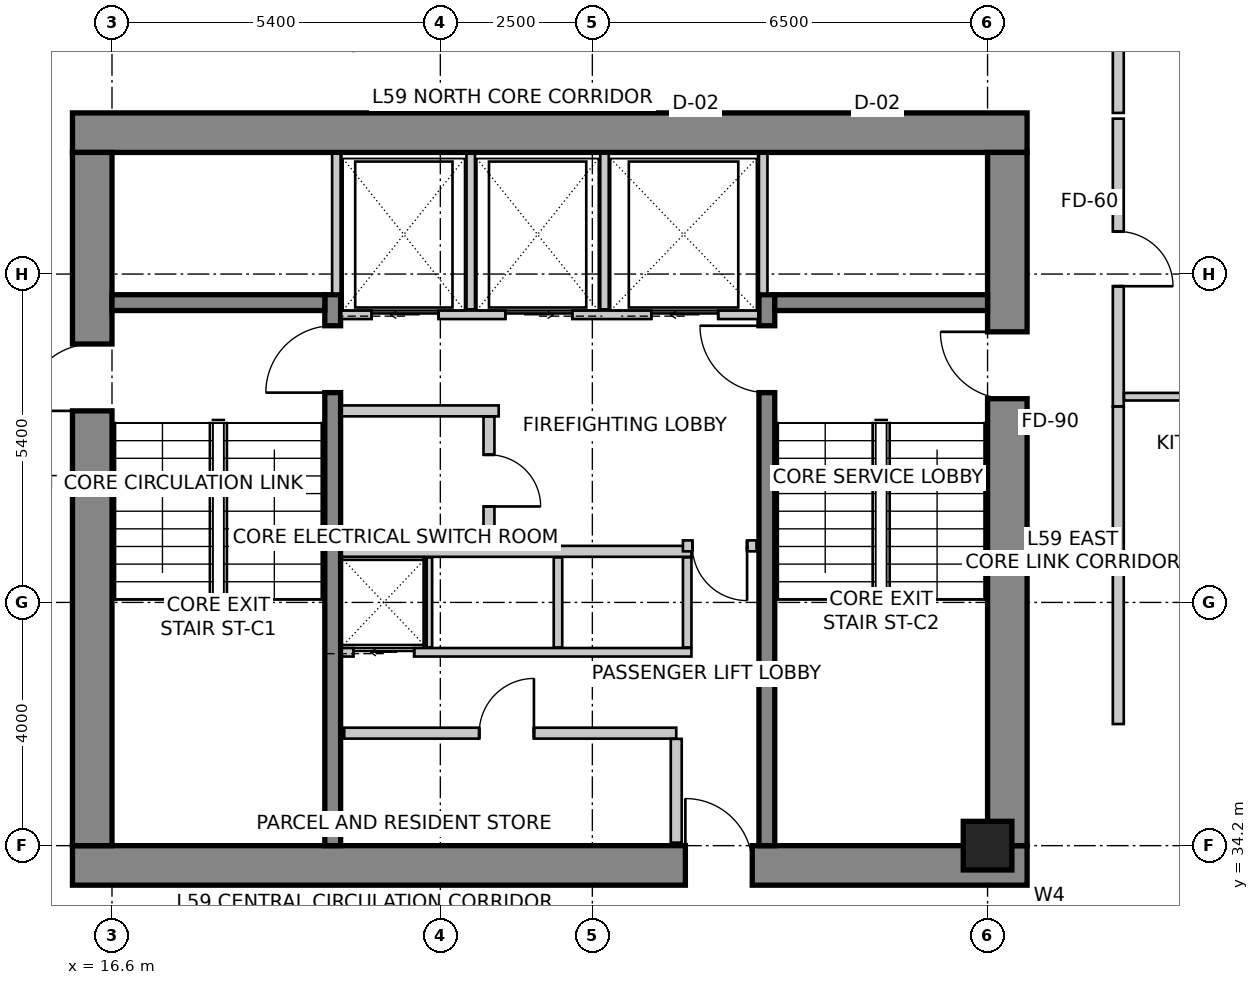
"""IFC4 building model, lengths in metres.
Left out: names, types, materials, properties, quantities, classifications, styles, units other than length and angle.
Written with IfcOpenShell. Run it as: python <this file> out.ifc"""

import sys

from ifc_helpers import new_model, si_unit, direction, frame, frame_2d, origin, origin_2d, place, context, subcontext, project, spatial, rectangle, extrude, source, transform, mapped, element, fill, save


model = new_model("IFC4")
c1 = context("Model", 3, precision=1e-05, world=origin(), true_north=direction((0.0, 1.0)))
c2 = subcontext(c1, "Body", "Model", "MODEL_VIEW")
j1 = project(units=[si_unit("LENGTHUNIT", "METRE"), si_unit("PLANEANGLEUNIT", "RADIAN")], contexts=[c1])
p1 = place(None, origin())
s1 = spatial("IfcSite", under=j1, at=p1, CompositionType="ELEMENT")
p2 = place(p1, origin())
s2 = spatial("IfcBuilding", under=s1, at=p2, CompositionType="ELEMENT")
p3 = place(p2, frame((0.0, 0.0, 232.4)))
s3 = spatial("IfcBuildingStorey", under=s2, at=p3, CompositionType="ELEMENT", Elevation=232.4)
p4 = place(p3, frame((15.95, 45.925, 0.0), z_axis=(0.0, 0.0, 1.0), x_axis=(1.0, 0.0, 0.0)))
e1 = element("IfcWall", 1, at=p4, inside=s3, PredefinedType="SHEAR", context=c2, shape_type="SweptSolid", body=[
    extrude(rectangle(XDim=15.7, YDim=0.65, at=frame_2d((7.85, 0.0))), origin(), (0.0, 0.0, 1.0), 3.5),
])
p5 = place(p3, frame((15.95, 33.875, 0.0), z_axis=(0.0, 0.0, 1.0), x_axis=(1.0, 0.0, 0.0)))
e2 = element("IfcWall", 2, at=p5, inside=s3, PredefinedType="SHEAR", context=c2, shape_type="SweptSolid", body=[
    extrude(rectangle(XDim=15.7, YDim=0.65, at=frame_2d((7.85, 0.0))), origin(), (0.0, 0.0, 1.0), 3.5),
])
m1 = source(origin(), c2, "Body", "SweptSolid", [
    extrude(rectangle(XDim=1.1, YDim=2.15, at=frame_2d((0.55, 1.075))), frame((0.0, 0.335, 0.0), z_axis=(0.0, -1.0, 0.0), x_axis=(1.0, 0.0, 0.0)), (0.0, 0.0, 1.0), 0.67),
])
p6 = place(p5, frame((10.08, 0.0, 0.0)))
e3 = element("IfcOpeningElement", 3, at=p6, cuts=e2, PredefinedType="OPENING", context=c2, shape_type="MappedRepresentation", body=[
    mapped(m1, transform((0.0, 0.0, 0.0), scale=1.0)),
])
p7 = place(p3, frame((16.275, 34.2, 0.0), z_axis=(0.0, 0.0, 1.0), x_axis=(0.0, 1.0, 0.0)))
e4 = element("IfcWall", 4, at=p7, inside=s3, PredefinedType="SHEAR", context=c2, shape_type="SweptSolid", body=[
    extrude(rectangle(XDim=11.4, YDim=0.65, at=frame_2d((5.7, 0.0))), origin(), (0.0, 0.0, 1.0), 3.5),
])
p8 = place(p7, frame((7.15, 0.0, 0.0)))
e5 = element("IfcOpeningElement", 5, at=p8, cuts=e4, PredefinedType="OPENING", context=c2, shape_type="MappedRepresentation", body=[
    mapped(m1, transform((0.0, 0.0, 0.0), scale=1.0)),
])
p9 = place(p3, frame((31.325, 34.2, 0.0), z_axis=(0.0, 0.0, 1.0), x_axis=(0.0, 1.0, 0.0)))
e6 = element("IfcWall", 6, at=p9, inside=s3, PredefinedType="SHEAR", context=c2, shape_type="SweptSolid", body=[
    extrude(rectangle(XDim=11.4, YDim=0.65, at=frame_2d((5.7, 0.0))), origin(), (0.0, 0.0, 1.0), 3.5),
])
p10 = place(p9, frame((7.35, 0.0, 0.0)))
e7 = element("IfcOpeningElement", 7, at=p10, cuts=e6, PredefinedType="OPENING", context=c2, shape_type="MappedRepresentation", body=[
    mapped(m1, transform((0.0, 0.0, 0.0), scale=1.0)),
])
p11 = place(p3, frame((20.23, 34.2, 0.0), z_axis=(0.0, 0.0, 1.0), x_axis=(0.0, 1.0, 0.0)))
e8 = element("IfcWall", 8, at=p11, inside=s3, PredefinedType="SHEAR", context=c2, shape_type="SweptSolid", body=[
    extrude(rectangle(XDim=9.06, YDim=0.26, at=frame_2d((4.53, 0.0))), origin(), (0.0, 0.0, 1.0), 3.5),
])
m2 = source(origin(), c2, "Body", "SweptSolid", [
    extrude(rectangle(XDim=1.1, YDim=2.15, at=frame_2d((0.55, 1.075))), frame((0.0, 0.14, 0.0), z_axis=(0.0, -1.0, 0.0), x_axis=(1.0, 0.0, 0.0)), (0.0, 0.0, 1.0), 0.28),
])
p12 = place(p11, frame((7.45, 0.0, 0.0)))
e9 = element("IfcOpeningElement", 9, at=p12, cuts=e8, PredefinedType="OPENING", context=c2, shape_type="MappedRepresentation", body=[
    mapped(m2, transform((0.0, 0.0, 0.0), scale=1.0)),
])
p13 = place(p3, frame((27.37, 34.2, 0.0), z_axis=(0.0, 0.0, 1.0), x_axis=(0.0, 1.0, 0.0)))
e10 = element("IfcWall", 10, at=p13, inside=s3, PredefinedType="SHEAR", context=c2, shape_type="SweptSolid", body=[
    extrude(rectangle(XDim=9.06, YDim=0.26, at=frame_2d((4.53, 0.0))), origin(), (0.0, 0.0, 1.0), 3.5),
])
p14 = place(p13, frame((7.45, 0.0, 0.0)))
e11 = element("IfcOpeningElement", 11, at=p14, cuts=e10, PredefinedType="OPENING", context=c2, shape_type="MappedRepresentation", body=[
    mapped(m2, transform((0.0, 0.0, 0.0), scale=1.0)),
])
for number, where, z_axis, x_axis in (
    (12, (16.6, 43.13, 0.0), (0.0, 0.0, 1.0), (1.0, 0.0, 0.0)),
    (13, (27.5, 43.13, 0.0), (0.0, 0.0, 1.0), (1.0, 0.0, 0.0)),
):
    element("IfcWall", number, at=place(p3, frame(where, z_axis=z_axis, x_axis=x_axis)), inside=s3, PredefinedType="SHEAR", context=c2, shape_type="SweptSolid", body=[
        extrude(rectangle(XDim=3.5, YDim=0.26, at=frame_2d((1.75, 0.0))), origin(), (0.0, 0.0, 1.0), 3.5),
    ])
m3 = source(origin(), c2, "Body", "SweptSolid", [
    extrude(rectangle(XDim=0.8, YDim=0.8, at=origin_2d()), origin(), (0.0, 0.0, 1.0), 3.5),
])
p15 = place(p3, frame((31.0, 34.2, 0.0), z_axis=(0.0, 0.0, 1.0), x_axis=(1.0, 0.0, 0.0)))
e14 = element("IfcColumn", 14, at=p15, inside=s3, PredefinedType="COLUMN", context=c2, shape_type="MappedRepresentation", body=[
    mapped(m3, transform((0.0, 0.0, 0.0), scale=1.0)),
])
p16 = place(p3, frame((21.874, 52.742, 0.0), z_axis=(0.0, 0.0, 1.0), x_axis=(-0.84365659959, -0.536883173482, 0.0)))
e15 = element("IfcWall", 15, at=p16, inside=s3, PredefinedType="SOLIDWALL", context=c2, shape_type="SweptSolid", body=[
    extrude(rectangle(XDim=10.283, YDim=0.3, at=frame_2d((5.142, 0.0))), origin(), (0.0, 0.0, 1.0), 3.25),
])
m4 = source(origin(), c2, "Body", "SweptSolid", [
    extrude(rectangle(XDim=2.4, YDim=2.2, at=frame_2d((1.2, 1.1))), frame((0.0, 0.16, 0.0), z_axis=(0.0, -1.0, 0.0), x_axis=(1.0, 0.0, 0.0)), (0.0, 0.0, 1.0), 0.32),
])
p17 = place(p16, frame((3.307, 0.0, 0.85)))
e16 = element("IfcOpeningElement", 16, at=p17, cuts=e15, PredefinedType="OPENING", context=c2, shape_type="MappedRepresentation", body=[
    mapped(m4, transform((0.0, 0.0, 0.0), scale=1.0)),
])
p18 = place(p3, frame((20.37, 42.93, 0.0), z_axis=(0.0, 0.0, 1.0), x_axis=(1.0, 0.0, 0.0)))
e17 = element("IfcWall", 17, at=p18, inside=s3, PredefinedType="SOLIDWALL", context=c2, shape_type="SweptSolid", body=[
    extrude(rectangle(XDim=6.86, YDim=0.14, at=frame_2d((3.43, 0.0))), origin(), (0.0, 0.0, 1.0), 3.25),
])
m5 = source(origin(), c2, "Body", "SweptSolid", [
    extrude(rectangle(XDim=1.1, YDim=2.15, at=frame_2d((0.55, 1.075))), frame((0.0, 0.08, 0.0), z_axis=(0.0, -1.0, 0.0), x_axis=(1.0, 0.0, 0.0)), (0.0, 0.0, 1.0), 0.16),
])
p19 = place(p18, frame((0.5, 0.0, 0.0)))
e18 = element("IfcOpeningElement", 18, at=p19, cuts=e17, PredefinedType="OPENING", context=c2, shape_type="MappedRepresentation", body=[
    mapped(m5, transform((0.0, 0.0, 0.0), scale=1.0)),
])
p20 = place(p18, frame((2.7, 0.0, 0.0)))
e19 = element("IfcOpeningElement", 19, at=p20, cuts=e17, PredefinedType="OPENING", context=c2, shape_type="MappedRepresentation", body=[
    mapped(m5, transform((0.0, 0.0, 0.0), scale=1.0)),
])
p21 = place(p18, frame((5.1, 0.0, 0.0)))
e20 = element("IfcOpeningElement", 20, at=p21, cuts=e17, PredefinedType="OPENING", context=c2, shape_type="MappedRepresentation", body=[
    mapped(m5, transform((0.0, 0.0, 0.0), scale=1.0)),
])
for number, where, z_axis, x_axis in (
    (21, (20.29, 43.28, 0.0), (0.0, 0.0, 1.0), (0.0, 1.0, 0.0)),
    (22, (27.31, 43.28, 0.0), (0.0, 0.0, 1.0), (0.0, 1.0, 0.0)),
):
    element("IfcWall", number, at=place(p3, frame(where, z_axis=z_axis, x_axis=x_axis)), inside=s3, PredefinedType="SOLIDWALL", context=c2, shape_type="SweptSolid", body=[
        extrude(rectangle(XDim=2.3, YDim=0.14, at=frame_2d((1.15, 0.0))), origin(), (0.0, 0.0, 1.0), 3.25),
    ])
for number, where, z_axis, x_axis in (
    (23, (22.5, 43.02, 0.0), (0.0, 0.0, 1.0), (0.0, 1.0, 0.0)),
    (24, (24.7, 43.02, 0.0), (0.0, 0.0, 1.0), (0.0, 1.0, 0.0)),
):
    element("IfcWall", number, at=place(p3, frame(where, z_axis=z_axis, x_axis=x_axis)), inside=s3, PredefinedType="SOLIDWALL", context=c2, shape_type="SweptSolid", body=[
        extrude(rectangle(XDim=2.56, YDim=0.14, at=frame_2d((1.28, 0.0))), origin(), (0.0, 0.0, 1.0), 3.25),
    ])
p22 = place(p3, frame((20.38, 37.38, 0.0), z_axis=(0.0, 0.0, 1.0), x_axis=(1.0, 0.0, 0.0)))
e25 = element("IfcWall", 25, at=p22, inside=s3, PredefinedType="SOLIDWALL", context=c2, shape_type="SweptSolid", body=[
    extrude(rectangle(XDim=5.75, YDim=0.14, at=frame_2d((2.875, 0.0))), origin(), (0.0, 0.0, 1.0), 3.25),
])
m6 = source(origin(), c2, "Body", "SweptSolid", [
    extrude(rectangle(XDim=1.0, YDim=2.15, at=frame_2d((0.5, 1.075))), frame((0.0, 0.08, 0.0), z_axis=(0.0, -1.0, 0.0), x_axis=(1.0, 0.0, 0.0)), (0.0, 0.0, 1.0), 0.16),
])
p23 = place(p22, frame((0.19, 0.0, 0.0)))
e26 = element("IfcOpeningElement", 26, at=p23, cuts=e25, PredefinedType="OPENING", context=c2, shape_type="MappedRepresentation", body=[
    mapped(m6, transform((0.0, 0.0, 0.0), scale=1.0)),
])
p24 = place(p3, frame((20.38, 39.04, 0.0), z_axis=(0.0, 0.0, 1.0), x_axis=(1.0, 0.0, 0.0)))
e27 = element("IfcWall", 27, at=p24, inside=s3, PredefinedType="SOLIDWALL", context=c2, shape_type="SweptSolid", body=[
    extrude(rectangle(XDim=5.75, YDim=0.18, at=frame_2d((2.875, 0.0))), origin(), (0.0, 0.0, 1.0), 3.25),
])
for number, where, z_axis, x_axis in (
    (28, (26.06, 37.46, 0.0), (0.0, 0.0, 1.0), (0.0, 1.0, 0.0)),
    (29, (21.795, 37.46, 0.0), (0.0, 0.0, 1.0), (0.0, 1.0, 0.0)),
    (30, (23.935, 37.46, 0.0), (0.0, 0.0, 1.0), (0.0, 1.0, 0.0)),
):
    element("IfcWall", number, at=place(p3, frame(where, z_axis=z_axis, x_axis=x_axis)), inside=s3, PredefinedType="SOLIDWALL", context=c2, shape_type="SweptSolid", body=[
        extrude(rectangle(XDim=1.48, YDim=0.14, at=frame_2d((0.74, 0.0))), origin(), (0.0, 0.0, 1.0), 3.25),
    ])
p25 = place(p3, frame((22.96, 41.35, 0.0), z_axis=(0.0, 0.0, 1.0), x_axis=(-1.0, 0.0, 0.0)))
e31 = element("IfcWall", 31, at=p25, inside=s3, PredefinedType="PARTITIONING", context=c2, shape_type="SweptSolid", body=[
    extrude(rectangle(XDim=2.58, YDim=0.18, at=frame_2d((1.29, 0.0))), origin(), (0.0, 0.0, 1.0), 3.25),
])
p26 = place(p3, frame((22.8, 41.256, 0.0), z_axis=(0.0, 0.0, 1.0), x_axis=(0.0, -1.0, 0.0)))
e32 = element("IfcWall", 32, at=p26, inside=s3, PredefinedType="PARTITIONING", context=c2, shape_type="SweptSolid", body=[
    extrude(rectangle(XDim=2.106, YDim=0.18, at=frame_2d((1.053, 0.0))), origin(), (0.0, 0.0, 1.0), 3.25),
])
m7 = source(origin(), c2, "Body", "SweptSolid", [
    extrude(rectangle(XDim=0.85, YDim=2.15, at=frame_2d((0.425, 1.075))), frame((0.0, 0.1, 0.0), z_axis=(0.0, -1.0, 0.0), x_axis=(1.0, 0.0, 0.0)), (0.0, 0.0, 1.0), 0.2),
])
p27 = place(p26, frame((0.628, 0.0, 0.0)))
e33 = element("IfcOpeningElement", 33, at=p27, cuts=e32, PredefinedType="OPENING", context=c2, shape_type="MappedRepresentation", body=[
    mapped(m7, transform((0.0, 0.0, 0.0), scale=1.0)),
])
p28 = place(p3, frame((27.2, 39.13, 0.0), z_axis=(0.0, 0.0, 1.0), x_axis=(-1.0, 0.0, 0.0)))
e34 = element("IfcWall", 34, at=p28, inside=s3, PredefinedType="PARTITIONING", context=c2, shape_type="SweptSolid", body=[
    extrude(rectangle(XDim=1.21, YDim=0.18, at=frame_2d((0.605, 0.0))), origin(), (0.0, 0.0, 1.0), 3.25),
])
m8 = source(origin(), c2, "Body", "SweptSolid", [
    extrude(rectangle(XDim=0.9, YDim=2.15, at=frame_2d((0.45, 1.075))), frame((0.0, 0.1, 0.0), z_axis=(0.0, -1.0, 0.0), x_axis=(1.0, 0.0, 0.0)), (0.0, 0.0, 1.0), 0.2),
])
p29 = place(p28, frame((0.155, 0.0, 0.0)))
e35 = element("IfcOpeningElement", 35, at=p29, cuts=e34, PredefinedType="OPENING", context=c2, shape_type="MappedRepresentation", body=[
    mapped(m8, transform((0.0, 0.0, 0.0), scale=1.0)),
])
p30 = place(p3, frame((20.42, 36.05, 0.0), z_axis=(0.0, 0.0, 1.0), x_axis=(1.0, 0.0, 0.0)))
e36 = element("IfcWall", 36, at=p30, inside=s3, PredefinedType="PARTITIONING", context=c2, shape_type="SweptSolid", body=[
    extrude(rectangle(XDim=5.46, YDim=0.18, at=frame_2d((2.73, 0.0))), origin(), (0.0, 0.0, 1.0), 3.25),
])
p31 = place(p30, frame((2.219, 0.0, 0.0)))
e37 = element("IfcOpeningElement", 37, at=p31, cuts=e36, PredefinedType="OPENING", context=c2, shape_type="MappedRepresentation", body=[
    mapped(m8, transform((0.0, 0.0, 0.0), scale=1.0)),
])
p32 = place(p3, frame((25.88, 35.956, 0.0), z_axis=(0.0, 0.0, 1.0), x_axis=(0.0, -1.0, 0.0)))
e38 = element("IfcWall", 38, at=p32, inside=s3, PredefinedType="PARTITIONING", context=c2, shape_type="SweptSolid", body=[
    extrude(rectangle(XDim=1.706, YDim=0.18, at=frame_2d((0.853, 0.0))), origin(), (0.0, 0.0, 1.0), 2.542),
])
p33 = place(p3, frame((33.15, 47.706, 0.0), z_axis=(0.0, 0.0, 1.0), x_axis=(0.0, -1.0, 0.0)))
e39 = element("IfcWall", 39, at=p33, inside=s3, PredefinedType="PARTITIONING", context=c2, shape_type="SweptSolid", body=[
    extrude(rectangle(XDim=1.456, YDim=0.18, at=frame_2d((0.728, 0.0))), origin(), (0.0, 0.0, 1.0), 2.934),
])
p34 = place(p3, frame((33.15, 38.948, 0.0), z_axis=(0.0, 0.0, 1.0), x_axis=(0.0, -1.0, 0.0)))
e40 = element("IfcWall", 40, at=p34, inside=s3, PredefinedType="PARTITIONING", context=c2, shape_type="SweptSolid", body=[
    extrude(rectangle(XDim=2.748, YDim=0.18, at=frame_2d((1.374, 0.0))), origin(), (0.0, 0.0, 1.0), 3.25),
])
p35 = place(p3, frame((33.15, 46.156, 0.0), z_axis=(0.0, 0.0, 1.0), x_axis=(0.0, -1.0, 0.0)))
e41 = element("IfcWall", 41, at=p35, inside=s3, PredefinedType="PARTITIONING", context=c2, shape_type="SweptSolid", body=[
    extrude(rectangle(XDim=4.733, YDim=0.18, at=frame_2d((2.366, 0.0))), origin(), (0.0, 0.0, 1.0), 2.822),
])
p36 = place(p35, frame((1.856, 0.0, 0.0)))
e42 = element("IfcOpeningElement", 42, at=p36, cuts=e41, PredefinedType="OPENING", context=c2, shape_type="MappedRepresentation", body=[
    mapped(m8, transform((0.0, 0.0, 0.0), scale=1.0)),
])
p37 = place(p3, frame((33.15, 41.421, 0.0), z_axis=(0.0, 0.0, 1.0), x_axis=(0.0, -1.0, 0.0)))
e43 = element("IfcWall", 43, at=p37, inside=s3, PredefinedType="PARTITIONING", context=c2, shape_type="SweptSolid", body=[
    extrude(rectangle(XDim=2.471, YDim=0.18, at=frame_2d((1.235, 0.0))), origin(), (0.0, 0.0, 1.0), 3.25),
])
p38 = place(p3, frame((33.244, 38.788, 0.0), z_axis=(0.0, 0.0, 1.0), x_axis=(1.0, 0.0, 0.0)))
e44 = element("IfcWall", 44, at=p38, inside=s3, PredefinedType="PARTITIONING", context=c2, shape_type="SweptSolid", body=[
    extrude(rectangle(XDim=6.346, YDim=0.125, at=frame_2d((3.173, 0.0))), origin(), (0.0, 0.0, 1.0), 2.766),
])
m9 = source(origin(), c2, "Body", "SweptSolid", [
    extrude(rectangle(XDim=0.9, YDim=2.15, at=frame_2d((0.45, 1.075))), frame((0.0, 0.073, 0.0), z_axis=(0.0, -1.0, 0.0), x_axis=(1.0, 0.0, 0.0)), (0.0, 0.0, 1.0), 0.145),
])
p39 = place(p38, frame((2.723, 0.0, 0.0)))
e45 = element("IfcOpeningElement", 45, at=p39, cuts=e44, PredefinedType="OPENING", context=c2, shape_type="MappedRepresentation", body=[
    mapped(m9, transform((0.0, 0.0, 0.0), scale=1.0)),
])
p40 = place(p3, frame((39.59, 41.583, 0.0), z_axis=(0.0, 0.0, 1.0), x_axis=(-1.0, 0.0, 0.0)))
e46 = element("IfcWall", 46, at=p40, inside=s3, PredefinedType="PARTITIONING", context=c2, shape_type="SweptSolid", body=[
    extrude(rectangle(XDim=6.346, YDim=0.125, at=frame_2d((3.173, 0.0))), origin(), (0.0, 0.0, 1.0), 2.766),
])
m10 = source(origin(), c2, "Body", "SweptSolid", [
    extrude(rectangle(XDim=0.85, YDim=2.15, at=frame_2d((0.425, 1.075))), frame((0.0, 0.073, 0.0), z_axis=(0.0, -1.0, 0.0), x_axis=(1.0, 0.0, 0.0)), (0.0, 0.0, 1.0), 0.145),
])
p41 = place(p40, frame((2.688, 0.0, 0.0)))
e47 = element("IfcOpeningElement", 47, at=p41, cuts=e46, PredefinedType="OPENING", context=c2, shape_type="MappedRepresentation", body=[
    mapped(m10, transform((0.0, 0.0, 0.0), scale=1.0)),
])
m11 = source(origin(), c2, "Body", "SweptSolid", [
    extrude(rectangle(XDim=1.1, YDim=2.15, at=frame_2d((0.55, 1.075))), frame((0.0, 0.025, 0.0), z_axis=(0.0, -1.0, 0.0), x_axis=(1.0, 0.0, 0.0)), (0.0, 0.0, 1.0), 0.05),
])
p42 = place(p19, origin())
e48 = element("IfcDoor", 48, at=p42, inside=s3, OperationType="SLIDING_TO_LEFT", PredefinedType="DOOR", context=c2, shape_type="MappedRepresentation", body=[
    mapped(m11, transform((0.0, 0.0, 0.0), scale=1.0)),
])
fill(e18, e48)
p43 = place(p20, origin())
e49 = element("IfcDoor", 49, at=p43, inside=s3, OperationType="SLIDING_TO_RIGHT", PredefinedType="DOOR", context=c2, shape_type="MappedRepresentation", body=[
    mapped(m11, transform((0.0, 0.0, 0.0), scale=1.0)),
])
fill(e19, e49)
m12 = source(origin(), c2, "Body", "SweptSolid", [
    extrude(rectangle(XDim=1.1, YDim=2.15, at=frame_2d((0.55, 1.075))), frame((0.0, 0.025, 0.0), z_axis=(0.0, -1.0, 0.0), x_axis=(1.0, 0.0, 0.0)), (0.0, 0.0, 1.0), 0.05),
])
p44 = place(p21, origin())
e50 = element("IfcDoor", 50, at=p44, inside=s3, OperationType="SLIDING_TO_LEFT", PredefinedType="DOOR", context=c2, shape_type="MappedRepresentation", body=[
    mapped(m12, transform((0.0, 0.0, 0.0), scale=1.0)),
])
fill(e20, e50)
m13 = source(origin(), c2, "Body", "SweptSolid", [
    extrude(rectangle(XDim=1.0, YDim=2.15, at=frame_2d((0.5, 1.075))), frame((0.0, 0.025, 0.0), z_axis=(0.0, -1.0, 0.0), x_axis=(1.0, 0.0, 0.0)), (0.0, 0.0, 1.0), 0.05),
])
p45 = place(p23, origin())
e51 = element("IfcDoor", 51, at=p45, inside=s3, OperationType="SLIDING_TO_LEFT", PredefinedType="DOOR", context=c2, shape_type="MappedRepresentation", body=[
    mapped(m13, transform((0.0, 0.0, 0.0), scale=1.0)),
])
fill(e26, e51)
m14 = source(origin(), c2, "Body", "SweptSolid", [
    extrude(rectangle(XDim=1.1, YDim=2.15, at=frame_2d((0.55, 1.075))), frame((0.0, 0.025, 0.0), z_axis=(0.0, -1.0, 0.0), x_axis=(1.0, 0.0, 0.0)), (0.0, 0.0, 1.0), 0.05),
])
p46 = place(p12, origin())
e52 = element("IfcDoor", 52, at=p46, inside=s3, OperationType="SINGLE_SWING_LEFT", PredefinedType="DOOR", context=c2, shape_type="MappedRepresentation", body=[
    mapped(m14, transform((0.0, 0.0, 0.0), scale=1.0)),
])
fill(e9, e52)
p47 = place(p14, origin())
e53 = element("IfcDoor", 53, at=p47, inside=s3, OperationType="SINGLE_SWING_RIGHT", PredefinedType="DOOR", context=c2, shape_type="MappedRepresentation", body=[
    mapped(m14, transform((0.0, 0.0, 0.0), scale=1.0)),
])
fill(e11, e53)
p48 = place(p8, origin())
e54 = element("IfcDoor", 54, at=p48, inside=s3, OperationType="SINGLE_SWING_LEFT", PredefinedType="DOOR", context=c2, shape_type="MappedRepresentation", body=[
    mapped(m14, transform((0.0, 0.0, 0.0), scale=1.0)),
])
fill(e5, e54)
p49 = place(p10, origin())
e55 = element("IfcDoor", 55, at=p49, inside=s3, OperationType="SINGLE_SWING_RIGHT", PredefinedType="DOOR", context=c2, shape_type="MappedRepresentation", body=[
    mapped(m14, transform((0.0, 0.0, 0.0), scale=1.0)),
])
fill(e7, e55)
p50 = place(p6, origin())
e56 = element("IfcDoor", 56, at=p50, inside=s3, OperationType="SINGLE_SWING_LEFT", PredefinedType="DOOR", context=c2, shape_type="MappedRepresentation", body=[
    mapped(m14, transform((0.0, 0.0, 0.0), scale=1.0)),
])
fill(e3, e56)
m15 = source(origin(), c2, "Body", "SweptSolid", [
    extrude(rectangle(XDim=0.85, YDim=2.15, at=frame_2d((0.425, 1.075))), frame((0.0, 0.025, 0.0), z_axis=(0.0, -1.0, 0.0), x_axis=(1.0, 0.0, 0.0)), (0.0, 0.0, 1.0), 0.05),
])
p51 = place(p27, origin())
e57 = element("IfcDoor", 57, at=p51, inside=s3, OperationType="SINGLE_SWING_RIGHT", PredefinedType="DOOR", context=c2, shape_type="MappedRepresentation", body=[
    mapped(m15, transform((0.0, 0.0, 0.0), scale=1.0)),
])
fill(e33, e57)
m16 = source(origin(), c2, "Body", "SweptSolid", [
    extrude(rectangle(XDim=0.9, YDim=2.15, at=frame_2d((0.45, 1.075))), frame((0.0, 0.025, 0.0), z_axis=(0.0, -1.0, 0.0), x_axis=(1.0, 0.0, 0.0)), (0.0, 0.0, 1.0), 0.05),
])
p52 = place(p29, origin())
e58 = element("IfcDoor", 58, at=p52, inside=s3, OperationType="SINGLE_SWING_LEFT", PredefinedType="DOOR", context=c2, shape_type="MappedRepresentation", body=[
    mapped(m16, transform((0.0, 0.0, 0.0), scale=1.0)),
])
fill(e35, e58)
p53 = place(p31, origin())
e59 = element("IfcDoor", 59, at=p53, inside=s3, OperationType="SINGLE_SWING_RIGHT", PredefinedType="DOOR", context=c2, shape_type="MappedRepresentation", body=[
    mapped(m16, transform((0.0, 0.0, 0.0), scale=1.0)),
])
fill(e37, e59)
p54 = place(p36, origin())
e60 = element("IfcDoor", 60, at=p54, inside=s3, OperationType="SINGLE_SWING_RIGHT", PredefinedType="DOOR", context=c2, shape_type="MappedRepresentation", body=[
    mapped(m16, transform((0.0, 0.0, 0.0), scale=1.0)),
])
fill(e42, e60)
save(model, sys.argv[1])
